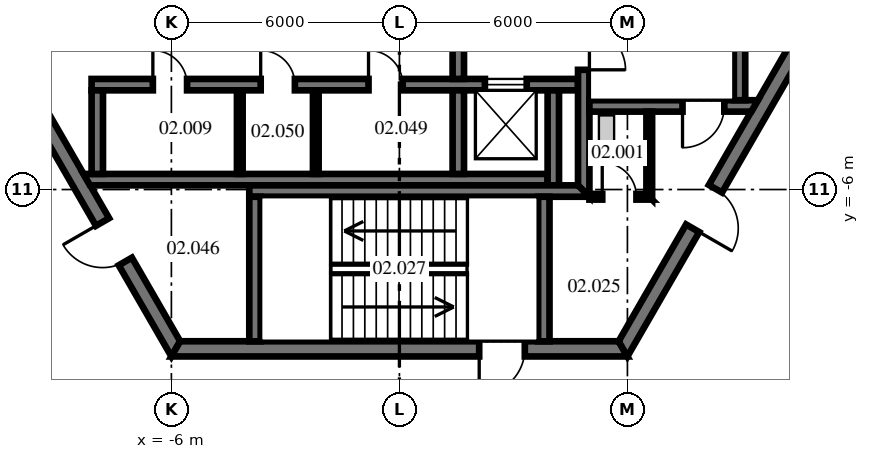
"""IFC4 building model, lengths in metres.
Left out: names, types, materials, properties, quantities, classifications, styles, units other than length and angle.
Written with IfcOpenShell. Run it as: python <this file> out.ifc"""

import sys

from ifc_helpers import new_model, si_unit, direction, frame, frame_2d, origin, place, context, subcontext, project, spatial, polyline, rectangle, outline, extrude, source, transform, mapped, element, fill, save


model = new_model("IFC4")
c1 = context("Model", 3, precision=1e-05, world=origin(), true_north=direction((0.0, 1.0)))
c2 = subcontext(c1, "Body", "Model", "MODEL_VIEW")
j1 = project(units=[si_unit("LENGTHUNIT", "METRE"), si_unit("PLANEANGLEUNIT", "RADIAN")], contexts=[c1])
p1 = place(None, origin())
s1 = spatial("IfcSite", under=j1, at=p1, CompositionType="ELEMENT")
p2 = place(p1, origin())
s2 = spatial("IfcBuilding", under=s1, at=p2, CompositionType="ELEMENT")
p3 = place(p2, frame((0.0, 0.0, 11.5)))
s3 = spatial("IfcBuildingStorey", under=s2, at=p3, CompositionType="ELEMENT", Elevation=11.5)
m1 = source(origin(), c2, "Body", "SweptSolid", [
    extrude(outline(polyline([(-0.115, -0.2), (11.885, -0.2), (11.654, 0.2), (0.115, 0.2), (-0.115, -0.2)])), origin(), (0.0, 0.0, 1.0), 4.3),
])
p4 = place(p3, frame((-11.769, 0.0, 0.0), z_axis=(0.0, 0.0, 1.0), x_axis=(0.499996592174, -0.866027371285, 0.0)))
e1 = element("IfcWall", 1, at=p4, inside=s3, PredefinedType="SHEAR", context=c2, shape_type="MappedRepresentation", body=[
    mapped(m1, transform((0.0, 0.0, 0.0), scale=1.0)),
])
p5 = place(p4, frame((1.405, 0.0, 0.0)))
e2 = element("IfcOpeningElement", 2, at=p5, cuts=e1, PredefinedType="OPENING", context=c2, shape_type="SweptSolid", body=[
    extrude(rectangle(XDim=1.8, YDim=2.1, at=frame_2d((0.9, 1.05))), frame((0.0, 0.21, 0.0), z_axis=(0.0, -1.0, 0.0), x_axis=(1.0, 0.0, 0.0)), (0.0, 0.0, 1.0), 0.42),
])
p6 = place(p4, frame((7.915, 0.0, 0.0)))
e3 = element("IfcOpeningElement", 3, at=p6, cuts=e1, PredefinedType="OPENING", context=c2, shape_type="SweptSolid", body=[
    extrude(rectangle(XDim=1.2, YDim=2.1, at=frame_2d((0.6, 1.05))), frame((0.0, 0.21, 0.0), z_axis=(0.0, -1.0, 0.0), x_axis=(1.0, 0.0, 0.0)), (0.0, 0.0, 1.0), 0.42),
])
p7 = place(p3, frame((-5.885, -10.192, 0.0), z_axis=(0.0, 0.0, 1.0), x_axis=(1.0, 0.0, 0.0)))
e4 = element("IfcWall", 4, at=p7, inside=s3, PredefinedType="SHEAR", context=c2, shape_type="MappedRepresentation", body=[
    mapped(m1, transform((0.0, 0.0, 0.0), scale=1.0)),
])
p8 = place(p7, frame((7.985, 0.0, 0.0)))
e5 = element("IfcOpeningElement", 5, at=p8, cuts=e4, PredefinedType="OPENING", context=c2, shape_type="SweptSolid", body=[
    extrude(rectangle(XDim=1.2, YDim=2.1, at=frame_2d((0.6, 1.05))), frame((0.0, 0.21, 0.0), z_axis=(0.0, -1.0, 0.0), x_axis=(1.0, 0.0, 0.0)), (0.0, 0.0, 1.0), 0.42),
])
p9 = place(p3, frame((5.885, -10.192, 0.0), z_axis=(0.0, 0.0, 1.0), x_axis=(0.499996592174, 0.866027371285, 0.0)))
e6 = element("IfcWall", 6, at=p9, inside=s3, PredefinedType="SHEAR", context=c2, shape_type="MappedRepresentation", body=[
    mapped(m1, transform((0.0, 0.0, 0.0), scale=1.0)),
])
p10 = place(p9, frame((3.665, 0.0, 0.0)))
e7 = element("IfcOpeningElement", 7, at=p10, cuts=e6, PredefinedType="OPENING", context=c2, shape_type="SweptSolid", body=[
    extrude(rectangle(XDim=1.2, YDim=2.1, at=frame_2d((0.6, 1.05))), frame((0.0, 0.21, 0.0), z_axis=(0.0, -1.0, 0.0), x_axis=(1.0, 0.0, 0.0)), (0.0, 0.0, 1.0), 0.42),
])
m2 = source(origin(), c2, "Body", "SweptSolid", [
    extrude(rectangle(XDim=12.8, YDim=0.3, at=frame_2d((6.4, 0.0))), origin(), (0.0, 0.0, 1.0), 4.3),
])
p11 = place(p3, frame((-8.1, -3.24, 0.0), z_axis=(0.0, 0.0, 1.0), x_axis=(1.0, 0.0, 0.0)))
e8 = element("IfcWall", 8, at=p11, inside=s3, PredefinedType="SHEAR", context=c2, shape_type="MappedRepresentation", body=[
    mapped(m2, transform((0.0, 0.0, 0.0), scale=1.0)),
])
p12 = place(p11, frame((1.613, 0.0, 0.0)))
e9 = element("IfcOpeningElement", 9, at=p12, cuts=e8, PredefinedType="OPENING", context=c2, shape_type="SweptSolid", body=[
    extrude(rectangle(XDim=0.9, YDim=2.1, at=frame_2d((0.45, 1.05))), frame((0.0, 0.16, 0.0), z_axis=(0.0, -1.0, 0.0), x_axis=(1.0, 0.0, 0.0)), (0.0, 0.0, 1.0), 0.32),
])
p13 = place(p11, frame((4.45, 0.0, 0.0)))
e10 = element("IfcOpeningElement", 10, at=p13, cuts=e8, PredefinedType="OPENING", context=c2, shape_type="SweptSolid", body=[
    extrude(rectangle(XDim=0.9, YDim=2.1, at=frame_2d((0.45, 1.05))), frame((0.0, 0.16, 0.0), z_axis=(0.0, -1.0, 0.0), x_axis=(1.0, 0.0, 0.0)), (0.0, 0.0, 1.0), 0.32),
])
p14 = place(p11, frame((7.288, 0.0, 0.0)))
e11 = element("IfcOpeningElement", 11, at=p14, cuts=e8, PredefinedType="OPENING", context=c2, shape_type="SweptSolid", body=[
    extrude(rectangle(XDim=0.9, YDim=2.1, at=frame_2d((0.45, 1.05))), frame((0.0, 0.16, 0.0), z_axis=(0.0, -1.0, 0.0), x_axis=(1.0, 0.0, 0.0)), (0.0, 0.0, 1.0), 0.32),
])
p15 = place(p11, frame((10.35, 0.0, 0.0)))
e12 = element("IfcOpeningElement", 12, at=p15, cuts=e8, PredefinedType="OPENING", context=c2, shape_type="SweptSolid", body=[
    extrude(rectangle(XDim=1.1, YDim=2.1, at=frame_2d((0.55, 1.05))), frame((0.0, 0.16, 0.0), z_axis=(0.0, -1.0, 0.0), x_axis=(1.0, 0.0, 0.0)), (0.0, 0.0, 1.0), 0.32),
])
m3 = source(origin(), c2, "Body", "SweptSolid", [
    extrude(outline(polyline([(12.0, -0.15), (-0.04, -0.15), (-0.213, 0.15), (12.0, 0.15), (12.0, -0.15)])), origin(), (0.0, 0.0, 1.0), 4.3),
])
p16 = place(p3, frame((-8.1, -5.74, 0.0), z_axis=(0.0, 0.0, 1.0), x_axis=(1.0, 0.0, 0.0)))
e13 = element("IfcWall", 13, at=p16, inside=s3, PredefinedType="SHEAR", context=c2, shape_type="MappedRepresentation", body=[
    mapped(m3, transform((0.0, 0.0, 0.0), scale=1.0)),
])
m4 = source(origin(), c2, "Body", "SweptSolid", [
    extrude(rectangle(XDim=2.2, YDim=0.3, at=frame_2d((1.1, 0.0))), origin(), (0.0, 0.0, 1.0), 4.3),
])
for number, where, z_axis, x_axis in (
    (14, (-7.95, -5.59, 0.0), (0.0, 0.0, 1.0), (0.0, 1.0, 0.0)),
    (15, (1.55, -5.59, 0.0), (0.0, 0.0, 1.0), (0.0, 1.0, 0.0)),
):
    element("IfcWall", number, at=place(p3, frame(where, z_axis=z_axis, x_axis=x_axis)), inside=s3, PredefinedType="SHEAR", context=c2, shape_type="MappedRepresentation", body=[
        mapped(m4, transform((0.0, 0.0, 0.0), scale=1.0)),
    ])
m5 = source(origin(), c2, "Body", "SweptSolid", [
    extrude(rectangle(XDim=2.5, YDim=0.3, at=frame_2d((1.25, 0.0))), origin(), (0.0, 0.0, 1.0), 4.3),
])
p17 = place(p3, frame((4.05, -5.89, 0.0), z_axis=(0.0, 0.0, 1.0), x_axis=(0.0, 1.0, 0.0)))
e16 = element("IfcWall", 16, at=p17, inside=s3, PredefinedType="SHEAR", context=c2, shape_type="MappedRepresentation", body=[
    mapped(m5, transform((0.0, 0.0, 0.0), scale=1.0)),
])
m6 = source(origin(), c2, "Body", "SweptSolid", [
    extrude(rectangle(XDim=3.0, YDim=0.3, at=frame_2d((1.5, 0.0))), origin(), (0.0, 0.0, 1.0), 4.3),
])
p18 = place(p3, frame((1.55, -3.09, 0.0), z_axis=(0.0, 0.0, 1.0), x_axis=(0.0, 1.0, 0.0)))
e17 = element("IfcWall", 17, at=p18, inside=s3, PredefinedType="SHEAR", context=c2, shape_type="MappedRepresentation", body=[
    mapped(m6, transform((0.0, 0.0, 0.0), scale=1.0)),
])
p19 = place(p18, frame((0.9, 0.0, 0.0)))
e18 = element("IfcOpeningElement", 18, at=p19, cuts=e17, PredefinedType="OPENING", context=c2, shape_type="SweptSolid", body=[
    extrude(rectangle(XDim=1.2, YDim=2.1, at=frame_2d((0.6, 1.05))), frame((0.0, 0.16, 0.0), z_axis=(0.0, -1.0, 0.0), x_axis=(1.0, 0.0, 0.0)), (0.0, 0.0, 1.0), 0.32),
])
m7 = source(origin(), c2, "Body", "SweptSolid", [
    extrude(outline(polyline([(-0.15, -0.15), (9.99, -0.15), (9.99, 0.15), (0.15, 0.15), (-0.15, -0.15)])), origin(), (0.0, 0.0, 1.0), 4.3),
])
p20 = place(p3, frame((4.85, -6.04, 0.0), z_axis=(0.0, 0.0, 1.0), x_axis=(0.0, 1.0, 0.0)))
e19 = element("IfcWall", 19, at=p20, inside=s3, PredefinedType="SHEAR", context=c2, shape_type="MappedRepresentation", body=[
    mapped(m7, transform((0.0, 0.0, 0.0), scale=1.0)),
])
p21 = place(p20, frame((3.19, 0.0, 0.0)))
e20 = element("IfcOpeningElement", 20, at=p21, cuts=e19, PredefinedType="OPENING", context=c2, shape_type="SweptSolid", body=[
    extrude(rectangle(XDim=1.1, YDim=2.1, at=frame_2d((0.55, 1.05))), frame((0.0, 0.16, 0.0), z_axis=(0.0, -1.0, 0.0), x_axis=(1.0, 0.0, 0.0)), (0.0, 0.0, 1.0), 0.32),
])
m8 = source(origin(), c2, "Body", "SweptSolid", [
    extrude(outline(polyline([(0.0, -0.15), (0.0, 0.15), (4.433, 0.15), (4.26, -0.15), (0.0, -0.15)])), origin(), (0.0, 0.0, 1.0), 4.3),
])
p22 = place(p3, frame((5.0, -3.8, 0.0), z_axis=(0.0, 0.0, 1.0), x_axis=(1.0, 0.0, 0.0)))
e21 = element("IfcWall", 21, at=p22, inside=s3, PredefinedType="SHEAR", context=c2, shape_type="MappedRepresentation", body=[
    mapped(m8, transform((0.0, 0.0, 0.0), scale=1.0)),
])
p23 = place(p22, frame((2.45, 0.0, 0.0)))
e22 = element("IfcOpeningElement", 22, at=p23, cuts=e21, PredefinedType="OPENING", context=c2, shape_type="SweptSolid", body=[
    extrude(rectangle(XDim=1.1, YDim=2.1, at=frame_2d((0.55, 1.05))), frame((0.0, 0.16, 0.0), z_axis=(0.0, -1.0, 0.0), x_axis=(1.0, 0.0, 0.0)), (0.0, 0.0, 1.0), 0.32),
])
m9 = source(origin(), c2, "Body", "SweptSolid", [
    extrude(rectangle(XDim=7.3, YDim=0.3, at=frame_2d((3.65, 0.0))), origin(), (0.0, 0.0, 1.0), 4.3),
])
p24 = place(p3, frame((8.95, -3.65, 0.0), z_axis=(0.0, 0.0, 1.0), x_axis=(0.0, 1.0, 0.0)))
e23 = element("IfcWall", 23, at=p24, inside=s3, PredefinedType="SHEAR", context=c2, shape_type="MappedRepresentation", body=[
    mapped(m9, transform((0.0, 0.0, 0.0), scale=1.0)),
])
m10 = source(origin(), c2, "Body", "SweptSolid", [
    extrude(outline(polyline([(0.0, -0.15), (8.95, -0.15), (8.65, 0.15), (0.0, 0.15), (0.0, -0.15)])), origin(), (0.0, 0.0, 1.0), 4.3),
])
p25 = place(p3, frame((-3.95, -6.04, 0.0), z_axis=(0.0, 0.0, 1.0), x_axis=(1.0, 0.0, 0.0)))
e24 = element("IfcWall", 24, at=p25, inside=s3, PredefinedType="SHEAR", context=c2, shape_type="MappedRepresentation", body=[
    mapped(m10, transform((0.0, 0.0, 0.0), scale=1.0)),
])
m11 = source(origin(), c2, "Body", "SweptSolid", [
    extrude(outline(polyline([(3.8, -0.15), (-0.004, -0.15), (-0.004, 0.15), (3.8, 0.15), (3.8, -0.15)])), origin(), (0.0, 0.0, 1.0), 4.3),
])
for number, where, z_axis, x_axis in (
    (25, (-3.8, -9.99, 0.0), (0.0, 0.0, 1.0), (0.0, 1.0, 0.0)),
    (26, (3.8, -9.99, 0.0), (0.0, 0.0, 1.0), (0.0, 1.0, 0.0)),
):
    element("IfcWall", number, at=place(p3, frame(where, z_axis=z_axis, x_axis=x_axis)), inside=s3, PredefinedType="SHEAR", context=c2, shape_type="MappedRepresentation", body=[
        mapped(m11, transform((0.0, 0.0, 0.0), scale=1.0)),
    ])
m12 = source(origin(), c2, "Body", "SweptSolid", [
    extrude(outline(polyline([(0.0, -0.075), (1.65, -0.075), (1.5, 0.075), (0.0, 0.075), (0.0, -0.075)])), origin(), (0.0, 0.0, 1.0), 4.3),
])
p26 = place(p3, frame((5.0, -6.19, 0.0), z_axis=(0.0, 0.0, 1.0), x_axis=(1.0, 0.0, 0.0)))
e27 = element("IfcWall", 27, at=p26, inside=s3, PredefinedType="PARTITIONING", context=c2, shape_type="MappedRepresentation", body=[
    mapped(m12, transform((0.0, 0.0, 0.0), scale=1.0)),
])
p27 = place(p26, frame((0.337, 0.0, 0.0)))
e28 = element("IfcOpeningElement", 28, at=p27, cuts=e27, PredefinedType="OPENING", context=c2, shape_type="SweptSolid", body=[
    extrude(rectangle(XDim=0.9, YDim=2.1, at=frame_2d((0.45, 1.05))), frame((0.0, 0.085, 0.0), z_axis=(0.0, -1.0, 0.0), x_axis=(1.0, 0.0, 0.0)), (0.0, 0.0, 1.0), 0.17),
])
m13 = source(origin(), c2, "Body", "SweptSolid", [
    extrude(outline(polyline([(-0.075, -0.075), (2.24, -0.075), (2.24, 0.075), (0.075, 0.075), (-0.075, -0.075)])), origin(), (0.0, 0.0, 1.0), 4.3),
])
p28 = place(p3, frame((6.575, -6.19, 0.0), z_axis=(0.0, 0.0, 1.0), x_axis=(0.0, 1.0, 0.0)))
e29 = element("IfcWall", 29, at=p28, inside=s3, PredefinedType="PARTITIONING", context=c2, shape_type="MappedRepresentation", body=[
    mapped(m13, transform((0.0, 0.0, 0.0), scale=1.0)),
])
m14 = source(origin(), c2, "Body", "SweptSolid", [
    extrude(rectangle(XDim=2.2, YDim=0.15, at=frame_2d((1.1, 0.0))), origin(), (0.0, 0.0, 1.0), 4.3),
])
for number, where, z_axis, x_axis in (
    (30, (-4.2, -5.59, 0.0), (0.0, 0.0, 1.0), (0.0, 1.0, 0.0)),
    (31, (-2.2, -5.59, 0.0), (0.0, 0.0, 1.0), (0.0, 1.0, 0.0)),
):
    element("IfcWall", number, at=place(p3, frame(where, z_axis=z_axis, x_axis=x_axis)), inside=s3, PredefinedType="PARTITIONING", context=c2, shape_type="MappedRepresentation", body=[
        mapped(m14, transform((0.0, 0.0, 0.0), scale=1.0)),
    ])
p29 = place(p3, frame((9.234, -15.991, 0.0), z_axis=(0.0, 0.0, 1.0), x_axis=(0.499997555488, 0.866026815119, 0.0)))
e32 = element("IfcWall", 32, at=p29, inside=s3, PredefinedType="PARTITIONING", context=c2, shape_type="SweptSolid", body=[
    extrude(rectangle(XDim=18.462, YDim=0.15, at=frame_2d((9.231, 0.0))), origin(), (0.0, 0.0, 1.0), 4.3),
])
p30 = place(p29, frame((3.648, 0.0, 0.0)))
e33 = element("IfcOpeningElement", 33, at=p30, cuts=e32, PredefinedType="OPENING", context=c2, shape_type="SweptSolid", body=[
    extrude(rectangle(XDim=1.8, YDim=2.4, at=frame_2d((0.9, 1.2))), frame((0.0, 0.085, 0.0), z_axis=(0.0, -1.0, 0.0), x_axis=(1.0, 0.0, 0.0)), (0.0, 0.0, 1.0), 0.17),
])
p31 = place(p29, frame((13.281, 0.0, 0.0)))
e34 = element("IfcOpeningElement", 34, at=p31, cuts=e32, PredefinedType="OPENING", context=c2, shape_type="SweptSolid", body=[
    extrude(rectangle(XDim=0.9, YDim=2.1, at=frame_2d((0.45, 1.05))), frame((0.0, 0.085, 0.0), z_axis=(0.0, -1.0, 0.0), x_axis=(1.0, 0.0, 0.0)), (0.0, 0.0, 1.0), 0.17),
])
p32 = place(p8, frame((1.2, 0.0, 0.0), z_axis=(0.0, 0.0, 1.0), x_axis=(-1.0, 0.0, 0.0)))
e35 = element("IfcDoor", 35, at=p32, inside=s3, OperationType="SINGLE_SWING_RIGHT", PredefinedType="DOOR", context=c2, shape_type="SweptSolid", body=[
    extrude(rectangle(XDim=1.2, YDim=2.1, at=frame_2d((0.6, 1.05))), frame((0.0, 0.025, 0.0), z_axis=(0.0, -1.0, 0.0), x_axis=(1.0, 0.0, 0.0)), (0.0, 0.0, 1.0), 0.05),
])
fill(e5, e35)
p33 = place(p10, frame((1.2, 0.0, 0.0), z_axis=(0.0, 0.0, 1.0), x_axis=(-1.0, 0.0, 0.0)))
e36 = element("IfcDoor", 36, at=p33, inside=s3, OperationType="SINGLE_SWING_RIGHT", PredefinedType="DOOR", context=c2, shape_type="SweptSolid", body=[
    extrude(rectangle(XDim=1.2, YDim=2.1, at=frame_2d((0.6, 1.05))), frame((0.0, 0.025, 0.0), z_axis=(0.0, -1.0, 0.0), x_axis=(1.0, 0.0, 0.0)), (0.0, 0.0, 1.0), 0.05),
])
fill(e7, e36)
p34 = place(p6, frame((1.2, 0.0, 0.0), z_axis=(0.0, 0.0, 1.0), x_axis=(-1.0, 0.0, 0.0)))
e37 = element("IfcDoor", 37, at=p34, inside=s3, OperationType="SINGLE_SWING_RIGHT", PredefinedType="DOOR", context=c2, shape_type="SweptSolid", body=[
    extrude(rectangle(XDim=1.2, YDim=2.1, at=frame_2d((0.6, 1.05))), frame((0.0, 0.025, 0.0), z_axis=(0.0, -1.0, 0.0), x_axis=(1.0, 0.0, 0.0)), (0.0, 0.0, 1.0), 0.05),
])
fill(e3, e37)
p35 = place(p21, frame((1.1, 0.0, 0.0), z_axis=(0.0, 0.0, 1.0), x_axis=(-1.0, 0.0, 0.0)))
e38 = element("IfcDoor", 38, at=p35, inside=s3, OperationType="SINGLE_SWING_RIGHT", PredefinedType="DOOR", context=c2, shape_type="SweptSolid", body=[
    extrude(rectangle(XDim=1.1, YDim=2.1, at=frame_2d((0.55, 1.05))), frame((0.0, 0.025, 0.0), z_axis=(0.0, -1.0, 0.0), x_axis=(1.0, 0.0, 0.0)), (0.0, 0.0, 1.0), 0.05),
])
fill(e20, e38)
p36 = place(p23, frame((1.1, 0.0, 0.0), z_axis=(0.0, 0.0, 1.0), x_axis=(-1.0, 0.0, 0.0)))
e39 = element("IfcDoor", 39, at=p36, inside=s3, OperationType="SINGLE_SWING_RIGHT", PredefinedType="DOOR", context=c2, shape_type="SweptSolid", body=[
    extrude(rectangle(XDim=1.1, YDim=2.1, at=frame_2d((0.55, 1.05))), frame((0.0, 0.025, 0.0), z_axis=(0.0, -1.0, 0.0), x_axis=(1.0, 0.0, 0.0)), (0.0, 0.0, 1.0), 0.05),
])
fill(e22, e39)
p37 = place(p27, origin())
e40 = element("IfcDoor", 40, at=p37, inside=s3, OperationType="SINGLE_SWING_LEFT", PredefinedType="DOOR", context=c2, shape_type="SweptSolid", body=[
    extrude(rectangle(XDim=0.9, YDim=2.1, at=frame_2d((0.45, 1.05))), frame((0.0, 0.025, 0.0), z_axis=(0.0, -1.0, 0.0), x_axis=(1.0, 0.0, 0.0)), (0.0, 0.0, 1.0), 0.05),
])
fill(e28, e40)
p38 = place(p12, origin())
e41 = element("IfcDoor", 41, at=p38, inside=s3, OperationType="SINGLE_SWING_LEFT", PredefinedType="DOOR", context=c2, shape_type="SweptSolid", body=[
    extrude(rectangle(XDim=0.9, YDim=2.1, at=frame_2d((0.45, 1.05))), frame((0.0, 0.025, 0.0), z_axis=(0.0, -1.0, 0.0), x_axis=(1.0, 0.0, 0.0)), (0.0, 0.0, 1.0), 0.05),
])
fill(e9, e41)
p39 = place(p13, origin())
e42 = element("IfcDoor", 42, at=p39, inside=s3, OperationType="SINGLE_SWING_LEFT", PredefinedType="DOOR", context=c2, shape_type="SweptSolid", body=[
    extrude(rectangle(XDim=0.9, YDim=2.1, at=frame_2d((0.45, 1.05))), frame((0.0, 0.025, 0.0), z_axis=(0.0, -1.0, 0.0), x_axis=(1.0, 0.0, 0.0)), (0.0, 0.0, 1.0), 0.05),
])
fill(e10, e42)
p40 = place(p14, origin())
e43 = element("IfcDoor", 43, at=p40, inside=s3, OperationType="SINGLE_SWING_LEFT", PredefinedType="DOOR", context=c2, shape_type="SweptSolid", body=[
    extrude(rectangle(XDim=0.9, YDim=2.1, at=frame_2d((0.45, 1.05))), frame((0.0, 0.025, 0.0), z_axis=(0.0, -1.0, 0.0), x_axis=(1.0, 0.0, 0.0)), (0.0, 0.0, 1.0), 0.05),
])
fill(e11, e43)
p41 = place(p15, origin())
e44 = element("IfcDoor", 44, at=p41, inside=s3, OperationType="DOUBLE_DOOR_SLIDING", PredefinedType="DOOR", context=c2, shape_type="SweptSolid", body=[
    extrude(rectangle(XDim=1.1, YDim=2.1, at=frame_2d((0.55, 1.05))), frame((0.0, 0.025, 0.0), z_axis=(0.0, -1.0, 0.0), x_axis=(1.0, 0.0, 0.0)), (0.0, 0.0, 1.0), 0.05),
])
fill(e12, e44)
save(model, sys.argv[1])
